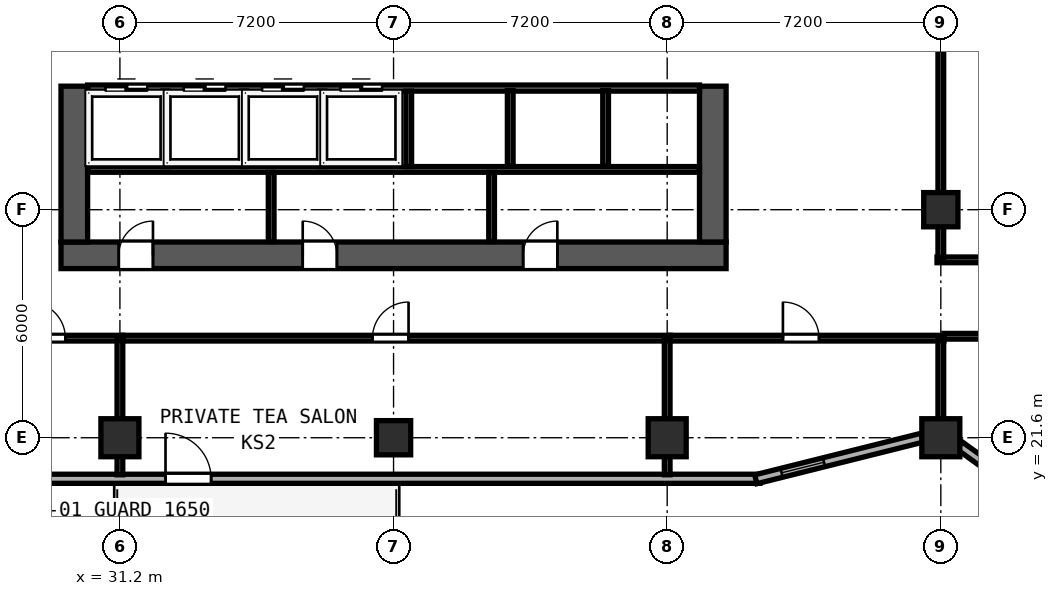
"""IFC4 building model, lengths in metres.
Left out: names, types, materials, properties, quantities, classifications, styles, units other than length and angle.
Written with IfcOpenShell. Run it as: python <this file> out.ifc"""

import sys

from ifc_helpers import new_model, si_unit, direction, frame, frame_2d, origin, origin_2d, place, context, subcontext, project, spatial, rectangle, hollow_rectangle, extrude, element, fill, save


model = new_model("IFC4")
c1 = context("Model", 3, precision=1e-05, world=origin(), true_north=direction((0.0, 1.0)))
c2 = subcontext(c1, "Body", "Model", "MODEL_VIEW")
j1 = project(units=[si_unit("LENGTHUNIT", "METRE"), si_unit("PLANEANGLEUNIT", "RADIAN")], contexts=[c1])
p1 = place(None, origin())
s1 = spatial("IfcSite", under=j1, at=p1, CompositionType="ELEMENT")
p2 = place(p1, origin())
s2 = spatial("IfcBuilding", under=s1, at=p2, CompositionType="ELEMENT")
p3 = place(p2, frame((0.0, 0.0, 113.6)))
s3 = spatial("IfcBuildingStorey", under=s2, at=p3, CompositionType="ELEMENT", Elevation=113.6)
p4 = place(p3, frame((29.65, 26.4, 0.0), z_axis=(0.0, 0.0, 1.0), x_axis=(1.0, 0.0, 0.0)))
e1 = element("IfcWall", 1, at=p4, inside=s3, PredefinedType="SHEAR", context=c2, shape_type="SweptSolid", body=[
    extrude(rectangle(XDim=17.5, YDim=0.7, at=frame_2d((8.75, 0.0))), origin(), (0.0, 0.0, 1.0), 3.6),
])
p5 = place(p4, frame((2.42, 0.0, 0.0), z_axis=(0.0, 0.0, 1.0), x_axis=(-1.0, 0.0, 0.0)))
e2 = element("IfcOpeningElement", 2, at=p5, cuts=e1, PredefinedType="OPENING", context=c2, shape_type="SweptSolid", body=[
    extrude(rectangle(XDim=0.9, YDim=2.1, at=frame_2d((0.45, 1.05))), frame((0.0, 0.36, 0.0), z_axis=(0.0, -1.0, 0.0), x_axis=(1.0, 0.0, 0.0)), (0.0, 0.0, 1.0), 0.72),
])
p6 = place(p4, frame((7.26, 0.0, 0.0), z_axis=(0.0, 0.0, 1.0), x_axis=(-1.0, 0.0, 0.0)))
e3 = element("IfcOpeningElement", 3, at=p6, cuts=e1, PredefinedType="OPENING", context=c2, shape_type="SweptSolid", body=[
    extrude(rectangle(XDim=0.9, YDim=2.1, at=frame_2d((0.45, 1.05))), frame((0.0, 0.36, 0.0), z_axis=(0.0, -1.0, 0.0), x_axis=(1.0, 0.0, 0.0)), (0.0, 0.0, 1.0), 0.72),
])
p7 = place(p4, frame((13.06, 0.0, 0.0), z_axis=(0.0, 0.0, 1.0), x_axis=(-1.0, 0.0, 0.0)))
e4 = element("IfcOpeningElement", 4, at=p7, cuts=e1, PredefinedType="OPENING", context=c2, shape_type="SweptSolid", body=[
    extrude(rectangle(XDim=0.9, YDim=2.1, at=frame_2d((0.45, 1.05))), frame((0.0, 0.36, 0.0), z_axis=(0.0, -1.0, 0.0), x_axis=(1.0, 0.0, 0.0)), (0.0, 0.0, 1.0), 0.72),
])
for number, where, z_axis, x_axis in (
    (5, (30.0, 26.75, 0.0), (0.0, 0.0, 1.0), (0.0, 1.0, 0.0)),
    (6, (46.8, 26.75, 0.0), (0.0, 0.0, 1.0), (0.0, 1.0, 0.0)),
):
    element("IfcWall", number, at=place(p3, frame(where, z_axis=z_axis, x_axis=x_axis)), inside=s3, PredefinedType="SHEAR", context=c2, shape_type="SweptSolid", body=[
        extrude(rectangle(XDim=4.1, YDim=0.7, at=frame_2d((2.05, 0.0))), origin(), (0.0, 0.0, 1.0), 3.6),
    ])
for number, where, z_axis, x_axis in (
    (7, (52.8, 21.6, 0.0), (0.0, 0.0, 1.0), (1.0, 0.0, 0.0)),
    (8, (31.2, 21.6, 0.0), (0.0, 0.0, 1.0), (1.0, 0.0, 0.0)),
    (9, (45.6, 21.6, 0.0), (0.0, 0.0, 1.0), (1.0, 0.0, 0.0)),
):
    element("IfcColumn", number, at=place(p3, frame(where, z_axis=z_axis, x_axis=x_axis)), inside=s3, PredefinedType="COLUMN", context=c2, shape_type="SweptSolid", body=[
        extrude(hollow_rectangle(XDim=1.0, YDim=1.0, WallThickness=0.038, at=origin_2d()), origin(), (0.0, 0.0, 1.0), 3.8),
    ])
for number, where, z_axis, x_axis in (
    (10, (52.8, 27.6, 0.0), (0.0, 0.0, 1.0), (1.0, 0.0, 0.0)),
    (11, (38.4, 21.6, 0.0), (0.0, 0.0, 1.0), (1.0, 0.0, 0.0)),
):
    element("IfcColumn", number, at=place(p3, frame(where, z_axis=z_axis, x_axis=x_axis)), inside=s3, PredefinedType="COLUMN", context=c2, shape_type="SweptSolid", body=[
        extrude(hollow_rectangle(XDim=0.9, YDim=0.9, WallThickness=0.034, at=origin_2d()), origin(), (0.0, 0.0, 1.0), 3.8),
    ])
p8 = place(p3, frame((28.76, 20.52, 0.0), z_axis=(0.0, 0.0, 1.0), x_axis=(1.0, 0.0, 0.0)))
e12 = element("IfcWall", 12, at=p8, inside=s3, PredefinedType="SOLIDWALL", context=c2, shape_type="SweptSolid", body=[
    extrude(rectangle(XDim=19.281, YDim=0.24, at=frame_2d((9.64, 0.0))), origin(), (0.0, 0.0, 1.0), 3.6),
])
p9 = place(p8, frame((4.84, 0.0, 0.0), z_axis=(0.0, 0.0, 1.0), x_axis=(-1.0, 0.0, 0.0)))
e13 = element("IfcOpeningElement", 13, at=p9, cuts=e12, PredefinedType="OPENING", context=c2, shape_type="SweptSolid", body=[
    extrude(rectangle(XDim=1.2, YDim=2.15, at=frame_2d((0.6, 1.075))), frame((0.0, 0.13, 0.0), z_axis=(0.0, -1.0, 0.0), x_axis=(1.0, 0.0, 0.0)), (0.0, 0.0, 1.0), 0.26),
])
p10 = place(p3, frame((47.932, 20.507, 0.0), z_axis=(0.0, 0.0, 1.0), x_axis=(0.970145683738, 0.242522890311, 0.0)))
e14 = element("IfcWall", 14, at=p10, inside=s3, PredefinedType="SOLIDWALL", context=c2, shape_type="SweptSolid", body=[
    extrude(rectangle(XDim=4.511, YDim=0.24, at=frame_2d((2.255, 0.0))), origin(), (0.0, 0.0, 1.0), 3.145),
])
p11 = place(p10, frame((0.7, 0.0, 0.85)))
e15 = element("IfcOpeningElement", 15, at=p11, cuts=e14, PredefinedType="OPENING", context=c2, shape_type="SweptSolid", body=[
    extrude(rectangle(XDim=1.15, YDim=1.8, at=frame_2d((0.575, 0.9))), frame((0.0, 0.13, 0.0), z_axis=(0.0, -1.0, 0.0), x_axis=(1.0, 0.0, 0.0)), (0.0, 0.0, 1.0), 0.26),
])
p12 = place(p3, frame((53.292, 21.394, 0.0), z_axis=(0.0, 0.0, 1.0), x_axis=(0.811543504691, -0.584291998913, 0.0)))
e16 = element("IfcWall", 16, at=p12, inside=s3, PredefinedType="SOLIDWALL", context=c2, shape_type="SweptSolid", body=[
    extrude(rectangle(XDim=11.623, YDim=0.24, at=frame_2d((5.812, 0.0))), origin(), (0.0, 0.0, 1.0), 3.145),
])
p13 = place(p12, frame((0.7, 0.0, 0.85)))
e17 = element("IfcOpeningElement", 17, at=p13, cuts=e16, PredefinedType="OPENING", context=c2, shape_type="SweptSolid", body=[
    extrude(rectangle(XDim=1.15, YDim=1.8, at=frame_2d((0.575, 0.9))), frame((0.0, 0.13, 0.0), z_axis=(0.0, -1.0, 0.0), x_axis=(1.0, 0.0, 0.0)), (0.0, 0.0, 1.0), 0.26),
])
p14 = place(p12, frame((5.967, 0.0, 0.85)))
e18 = element("IfcOpeningElement", 18, at=p14, cuts=e16, PredefinedType="OPENING", context=c2, shape_type="SweptSolid", body=[
    extrude(rectangle(XDim=1.15, YDim=1.8, at=frame_2d((0.575, 0.9))), frame((0.0, 0.13, 0.0), z_axis=(0.0, -1.0, 0.0), x_axis=(1.0, 0.0, 0.0)), (0.0, 0.0, 1.0), 0.26),
])
p15 = place(p3, frame((30.35, 30.8, 0.0), z_axis=(0.0, 0.0, 1.0), x_axis=(1.0, 0.0, 0.0)))
e19 = element("IfcWall", 19, at=p15, inside=s3, PredefinedType="SOLIDWALL", context=c2, shape_type="SweptSolid", body=[
    extrude(rectangle(XDim=16.1, YDim=0.16, at=frame_2d((8.05, 0.0))), origin(), (0.0, 0.0, 1.0), 3.6),
])
p16 = place(p15, frame((0.47, 0.0, 0.0)))
e20 = element("IfcOpeningElement", 20, at=p16, cuts=e19, PredefinedType="OPENING", context=c2, shape_type="SweptSolid", body=[
    extrude(rectangle(XDim=1.1, YDim=2.2, at=frame_2d((0.55, 1.1))), frame((0.0, 0.09, 0.0), z_axis=(0.0, -1.0, 0.0), x_axis=(1.0, 0.0, 0.0)), (0.0, 0.0, 1.0), 0.18),
])
p17 = place(p15, frame((2.53, 0.0, 0.0)))
e21 = element("IfcOpeningElement", 21, at=p17, cuts=e19, PredefinedType="OPENING", context=c2, shape_type="SweptSolid", body=[
    extrude(rectangle(XDim=1.1, YDim=2.2, at=frame_2d((0.55, 1.1))), frame((0.0, 0.09, 0.0), z_axis=(0.0, -1.0, 0.0), x_axis=(1.0, 0.0, 0.0)), (0.0, 0.0, 1.0), 0.18),
])
p18 = place(p15, frame((4.59, 0.0, 0.0)))
e22 = element("IfcOpeningElement", 22, at=p18, cuts=e19, PredefinedType="OPENING", context=c2, shape_type="SweptSolid", body=[
    extrude(rectangle(XDim=1.1, YDim=2.2, at=frame_2d((0.55, 1.1))), frame((0.0, 0.09, 0.0), z_axis=(0.0, -1.0, 0.0), x_axis=(1.0, 0.0, 0.0)), (0.0, 0.0, 1.0), 0.18),
])
p19 = place(p15, frame((6.65, 0.0, 0.0)))
e23 = element("IfcOpeningElement", 23, at=p19, cuts=e19, PredefinedType="OPENING", context=c2, shape_type="SweptSolid", body=[
    extrude(rectangle(XDim=1.1, YDim=2.2, at=frame_2d((0.55, 1.1))), frame((0.0, 0.09, 0.0), z_axis=(0.0, -1.0, 0.0), x_axis=(1.0, 0.0, 0.0)), (0.0, 0.0, 1.0), 0.18),
])
p20 = place(p3, frame((30.35, 28.66, 0.0), z_axis=(0.0, 0.0, 1.0), x_axis=(1.0, 0.0, 0.0)))
e24 = element("IfcWall", 24, at=p20, inside=s3, PredefinedType="PARTITIONING", context=c2, shape_type="SweptSolid", body=[
    extrude(rectangle(XDim=16.1, YDim=0.15, at=frame_2d((8.05, 0.0))), origin(), (0.0, 0.0, 1.0), 3.6),
])
for number, where, z_axis, x_axis in (
    (25, (32.4, 28.735, 0.0), (0.0, 0.0, 1.0), (0.0, 1.0, 0.0)),
    (26, (34.46, 28.735, 0.0), (0.0, 0.0, 1.0), (0.0, 1.0, 0.0)),
    (27, (36.52, 28.735, 0.0), (0.0, 0.0, 1.0), (0.0, 1.0, 0.0)),
    (28, (38.8, 28.735, 0.0), (0.0, 0.0, 1.0), (0.0, 1.0, 0.0)),
):
    element("IfcWall", number, at=place(p3, frame(where, z_axis=z_axis, x_axis=x_axis)), inside=s3, PredefinedType="SOLIDWALL", context=c2, shape_type="SweptSolid", body=[
        extrude(rectangle(XDim=1.985, YDim=0.15, at=frame_2d((0.992, 0.0))), origin(), (0.0, 0.0, 1.0), 3.6),
    ])
for number, where, z_axis, x_axis in (
    (29, (35.18, 26.76, 0.0), (0.0, 0.0, 1.0), (0.0, 1.0, 0.0)),
    (30, (40.98, 26.76, 0.0), (0.0, 0.0, 1.0), (0.0, 1.0, 0.0)),
):
    element("IfcWall", number, at=place(p3, frame(where, z_axis=z_axis, x_axis=x_axis)), inside=s3, PredefinedType="PARTITIONING", context=c2, shape_type="SweptSolid", body=[
        extrude(rectangle(XDim=1.82, YDim=0.15, at=frame_2d((0.91, 0.0))), origin(), (0.0, 0.0, 1.0), 3.6),
    ])
for number, where, z_axis, x_axis in (
    (31, (41.47, 28.75, 0.0), (0.0, 0.0, 1.0), (0.0, 1.0, 0.0)),
    (32, (43.98, 28.75, 0.0), (0.0, 0.0, 1.0), (0.0, 1.0, 0.0)),
):
    element("IfcWall", number, at=place(p3, frame(where, z_axis=z_axis, x_axis=x_axis)), inside=s3, PredefinedType="SOLIDWALL", context=c2, shape_type="SweptSolid", body=[
        extrude(rectangle(XDim=1.985, YDim=0.15, at=frame_2d((0.993, 0.0))), origin(), (0.0, 0.0, 1.0), 3.6),
    ])
p21 = place(p3, frame((23.92, 24.22, 0.0), z_axis=(0.0, 0.0, 1.0), x_axis=(1.0, 0.0, 0.0)))
e33 = element("IfcWall", 33, at=p21, inside=s3, PredefinedType="PARTITIONING", context=c2, shape_type="SweptSolid", body=[
    extrude(rectangle(XDim=7.36, YDim=0.15, at=frame_2d((3.68, 0.0))), origin(), (0.0, 0.0, 1.0), 3.6),
])
p22 = place(p21, frame((5.845, 0.0, 0.0), z_axis=(0.0, 0.0, 1.0), x_axis=(-1.0, 0.0, 0.0)))
e34 = element("IfcOpeningElement", 34, at=p22, cuts=e33, PredefinedType="OPENING", context=c2, shape_type="SweptSolid", body=[
    extrude(rectangle(XDim=0.95, YDim=2.12, at=frame_2d((0.475, 1.06))), frame((0.0, 0.085, 0.0), z_axis=(0.0, -1.0, 0.0), x_axis=(1.0, 0.0, 0.0)), (0.0, 0.0, 1.0), 0.17),
])
p23 = place(p3, frame((31.2, 20.625, 0.0), z_axis=(0.0, 0.0, 1.0), x_axis=(0.0, 1.0, 0.0)))
e35 = element("IfcWall", 35, at=p23, inside=s3, PredefinedType="PARTITIONING", context=c2, shape_type="SweptSolid", body=[
    extrude(rectangle(XDim=3.535, YDim=0.15, at=frame_2d((1.768, 0.0))), origin(), (0.0, 0.0, 1.0), 3.085),
])
p24 = place(p3, frame((31.282, 24.22, 0.0), z_axis=(0.0, 0.0, 1.0), x_axis=(1.0, 0.0, 0.0)))
e36 = element("IfcWall", 36, at=p24, inside=s3, PredefinedType="PARTITIONING", context=c2, shape_type="SweptSolid", body=[
    extrude(rectangle(XDim=14.398, YDim=0.15, at=frame_2d((7.199, 0.0))), origin(), (0.0, 0.0, 1.0), 3.6),
])
p25 = place(p24, frame((7.513, 0.0, 0.0), z_axis=(0.0, 0.0, 1.0), x_axis=(-1.0, 0.0, 0.0)))
e37 = element("IfcOpeningElement", 37, at=p25, cuts=e36, PredefinedType="OPENING", context=c2, shape_type="SweptSolid", body=[
    extrude(rectangle(XDim=0.95, YDim=2.12, at=frame_2d((0.475, 1.06))), frame((0.0, 0.085, 0.0), z_axis=(0.0, -1.0, 0.0), x_axis=(1.0, 0.0, 0.0)), (0.0, 0.0, 1.0), 0.17),
])
p26 = place(p3, frame((45.6, 20.625, 0.0), z_axis=(0.0, 0.0, 1.0), x_axis=(0.0, 1.0, 0.0)))
e38 = element("IfcWall", 38, at=p26, inside=s3, PredefinedType="PARTITIONING", context=c2, shape_type="SweptSolid", body=[
    extrude(rectangle(XDim=3.535, YDim=0.15, at=frame_2d((1.768, 0.0))), origin(), (0.0, 0.0, 1.0), 3.085),
])
p27 = place(p3, frame((45.682, 24.22, 0.0), z_axis=(0.0, 0.0, 1.0), x_axis=(1.0, 0.0, 0.0)))
e39 = element("IfcWall", 39, at=p27, inside=s3, PredefinedType="PARTITIONING", context=c2, shape_type="SweptSolid", body=[
    extrude(rectangle(XDim=7.198, YDim=0.15, at=frame_2d((3.599, 0.0))), origin(), (0.0, 0.0, 1.0), 3.6),
])
p28 = place(p27, frame((3.913, 0.0, 0.0), z_axis=(0.0, 0.0, 1.0), x_axis=(-1.0, 0.0, 0.0)))
e40 = element("IfcOpeningElement", 40, at=p28, cuts=e39, PredefinedType="OPENING", context=c2, shape_type="SweptSolid", body=[
    extrude(rectangle(XDim=0.95, YDim=2.12, at=frame_2d((0.475, 1.06))), frame((0.0, 0.085, 0.0), z_axis=(0.0, -1.0, 0.0), x_axis=(1.0, 0.0, 0.0)), (0.0, 0.0, 1.0), 0.17),
])
p29 = place(p3, frame((52.8, 21.819, 0.0), z_axis=(0.0, 0.0, 1.0), x_axis=(0.0, 1.0, 0.0)))
e41 = element("IfcWall", 41, at=p29, inside=s3, PredefinedType="PARTITIONING", context=c2, shape_type="SweptSolid", body=[
    extrude(rectangle(XDim=2.341, YDim=0.15, at=frame_2d((1.171, 0.0))), origin(), (0.0, 0.0, 1.0), 3.145),
])
p30 = place(p3, frame((52.7, 26.28, 0.0), z_axis=(0.0, 0.0, 1.0), x_axis=(1.0, 0.0, 0.0)))
e42 = element("IfcWall", 42, at=p30, inside=s3, PredefinedType="PARTITIONING", context=c2, shape_type="SweptSolid", body=[
    extrude(rectangle(XDim=7.68, YDim=0.15, at=frame_2d((3.84, 0.0))), origin(), (0.0, 0.0, 1.0), 3.6),
])
p31 = place(p30, frame((4.048, 0.0, 0.0)))
e43 = element("IfcOpeningElement", 43, at=p31, cuts=e42, PredefinedType="OPENING", context=c2, shape_type="SweptSolid", body=[
    extrude(rectangle(XDim=0.95, YDim=2.18, at=frame_2d((0.475, 1.09))), frame((0.0, 0.085, 0.0), z_axis=(0.0, -1.0, 0.0), x_axis=(1.0, 0.0, 0.0)), (0.0, 0.0, 1.0), 0.17),
])
p32 = place(p3, frame((52.8, 26.34, 0.0), z_axis=(0.0, 0.0, 1.0), x_axis=(0.0, 1.0, 0.0)))
e44 = element("IfcWall", 44, at=p32, inside=s3, PredefinedType="PARTITIONING", context=c2, shape_type="SweptSolid", body=[
    extrude(rectangle(XDim=6.6, YDim=0.15, at=frame_2d((3.3, 0.0))), origin(), (0.0, 0.0, 1.0), 3.145),
])
p33 = place(p3, frame((52.882, 24.27, 0.0), z_axis=(0.0, 0.0, 1.0), x_axis=(1.0, 0.0, 0.0)))
e45 = element("IfcWall", 45, at=p33, inside=s3, PredefinedType="PARTITIONING", context=c2, shape_type="SweptSolid", body=[
    extrude(rectangle(XDim=6.538, YDim=0.15, at=frame_2d((3.269, 0.0))), origin(), (0.0, 0.0, 1.0), 3.6),
])
p34 = place(p33, frame((4.329, 0.0, 0.0), z_axis=(0.0, 0.0, 1.0), x_axis=(-1.0, 0.0, 0.0)))
e46 = element("IfcOpeningElement", 46, at=p34, cuts=e45, PredefinedType="OPENING", context=c2, shape_type="SweptSolid", body=[
    extrude(rectangle(XDim=0.95, YDim=2.15, at=frame_2d((0.475, 1.075))), frame((0.0, 0.085, 0.0), z_axis=(0.0, -1.0, 0.0), x_axis=(1.0, 0.0, 0.0)), (0.0, 0.0, 1.0), 0.17),
])
p35 = place(p11, origin())
e47 = element("IfcWindow", 47, at=p35, inside=s3, PartitioningType="SINGLE_PANEL", PredefinedType="WINDOW", context=c2, shape_type="SweptSolid", body=[
    extrude(rectangle(XDim=1.15, YDim=1.8, at=frame_2d((0.575, 0.9))), frame((0.0, 0.03, 0.0), z_axis=(0.0, -1.0, 0.0), x_axis=(1.0, 0.0, 0.0)), (0.0, 0.0, 1.0), 0.06),
])
fill(e15, e47)
p36 = place(p9, origin())
e48 = element("IfcDoor", 48, at=p36, inside=s3, OperationType="SINGLE_SWING_RIGHT", PredefinedType="DOOR", context=c2, shape_type="SweptSolid", body=[
    extrude(rectangle(XDim=1.2, YDim=2.15, at=frame_2d((0.6, 1.075))), frame((0.0, 0.025, 0.0), z_axis=(0.0, -1.0, 0.0), x_axis=(1.0, 0.0, 0.0)), (0.0, 0.0, 1.0), 0.05),
])
fill(e13, e48)
p37 = place(p16, origin())
e49 = element("IfcDoor", 49, at=p37, inside=s3, OperationType="SLIDING_TO_LEFT", PredefinedType="DOOR", context=c2, shape_type="SweptSolid", body=[
    extrude(rectangle(XDim=1.1, YDim=2.2, at=frame_2d((0.55, 1.1))), frame((0.0, 0.025, 0.0), z_axis=(0.0, -1.0, 0.0), x_axis=(1.0, 0.0, 0.0)), (0.0, 0.0, 1.0), 0.05),
])
fill(e20, e49)
p38 = place(p17, origin())
e50 = element("IfcDoor", 50, at=p38, inside=s3, OperationType="SLIDING_TO_LEFT", PredefinedType="DOOR", context=c2, shape_type="SweptSolid", body=[
    extrude(rectangle(XDim=1.1, YDim=2.2, at=frame_2d((0.55, 1.1))), frame((0.0, 0.025, 0.0), z_axis=(0.0, -1.0, 0.0), x_axis=(1.0, 0.0, 0.0)), (0.0, 0.0, 1.0), 0.05),
])
fill(e21, e50)
p39 = place(p18, origin())
e51 = element("IfcDoor", 51, at=p39, inside=s3, OperationType="SLIDING_TO_LEFT", PredefinedType="DOOR", context=c2, shape_type="SweptSolid", body=[
    extrude(rectangle(XDim=1.1, YDim=2.2, at=frame_2d((0.55, 1.1))), frame((0.0, 0.025, 0.0), z_axis=(0.0, -1.0, 0.0), x_axis=(1.0, 0.0, 0.0)), (0.0, 0.0, 1.0), 0.05),
])
fill(e22, e51)
p40 = place(p19, origin())
e52 = element("IfcDoor", 52, at=p40, inside=s3, OperationType="SLIDING_TO_LEFT", PredefinedType="DOOR", context=c2, shape_type="SweptSolid", body=[
    extrude(rectangle(XDim=1.1, YDim=2.2, at=frame_2d((0.55, 1.1))), frame((0.0, 0.025, 0.0), z_axis=(0.0, -1.0, 0.0), x_axis=(1.0, 0.0, 0.0)), (0.0, 0.0, 1.0), 0.05),
])
fill(e23, e52)
p41 = place(p5, origin())
e53 = element("IfcDoor", 53, at=p41, inside=s3, OperationType="SINGLE_SWING_LEFT", PredefinedType="DOOR", context=c2, shape_type="SweptSolid", body=[
    extrude(rectangle(XDim=0.9, YDim=2.1, at=frame_2d((0.45, 1.05))), frame((0.0, -0.195, 0.0), z_axis=(0.0, -1.0, 0.0), x_axis=(1.0, 0.0, 0.0)), (0.0, 0.0, 1.0), 0.05),
])
fill(e2, e53)
p42 = place(p6, origin())
e54 = element("IfcDoor", 54, at=p42, inside=s3, OperationType="SINGLE_SWING_RIGHT", PredefinedType="DOOR", context=c2, shape_type="SweptSolid", body=[
    extrude(rectangle(XDim=0.9, YDim=2.1, at=frame_2d((0.45, 1.05))), frame((0.0, -0.195, 0.0), z_axis=(0.0, -1.0, 0.0), x_axis=(1.0, 0.0, 0.0)), (0.0, 0.0, 1.0), 0.05),
])
fill(e3, e54)
p43 = place(p7, origin())
e55 = element("IfcDoor", 55, at=p43, inside=s3, OperationType="SINGLE_SWING_LEFT", PredefinedType="DOOR", context=c2, shape_type="SweptSolid", body=[
    extrude(rectangle(XDim=0.9, YDim=2.1, at=frame_2d((0.45, 1.05))), frame((0.0, -0.195, 0.0), z_axis=(0.0, -1.0, 0.0), x_axis=(1.0, 0.0, 0.0)), (0.0, 0.0, 1.0), 0.05),
])
fill(e4, e55)
p44 = place(p22, origin())
e56 = element("IfcDoor", 56, at=p44, inside=s3, OperationType="SINGLE_SWING_RIGHT", PredefinedType="DOOR", context=c2, shape_type="SweptSolid", body=[
    extrude(rectangle(XDim=0.95, YDim=2.12, at=frame_2d((0.475, 1.06))), frame((0.0, 0.025, 0.0), z_axis=(0.0, -1.0, 0.0), x_axis=(1.0, 0.0, 0.0)), (0.0, 0.0, 1.0), 0.05),
])
fill(e34, e56)
p45 = place(p25, origin())
e57 = element("IfcDoor", 57, at=p45, inside=s3, OperationType="SINGLE_SWING_LEFT", PredefinedType="DOOR", context=c2, shape_type="SweptSolid", body=[
    extrude(rectangle(XDim=0.95, YDim=2.12, at=frame_2d((0.475, 1.06))), frame((0.0, 0.025, 0.0), z_axis=(0.0, -1.0, 0.0), x_axis=(1.0, 0.0, 0.0)), (0.0, 0.0, 1.0), 0.05),
])
fill(e37, e57)
p46 = place(p28, origin())
e58 = element("IfcDoor", 58, at=p46, inside=s3, OperationType="SINGLE_SWING_RIGHT", PredefinedType="DOOR", context=c2, shape_type="SweptSolid", body=[
    extrude(rectangle(XDim=0.95, YDim=2.12, at=frame_2d((0.475, 1.06))), frame((0.0, 0.025, 0.0), z_axis=(0.0, -1.0, 0.0), x_axis=(1.0, 0.0, 0.0)), (0.0, 0.0, 1.0), 0.05),
])
fill(e40, e58)
save(model, sys.argv[1])
